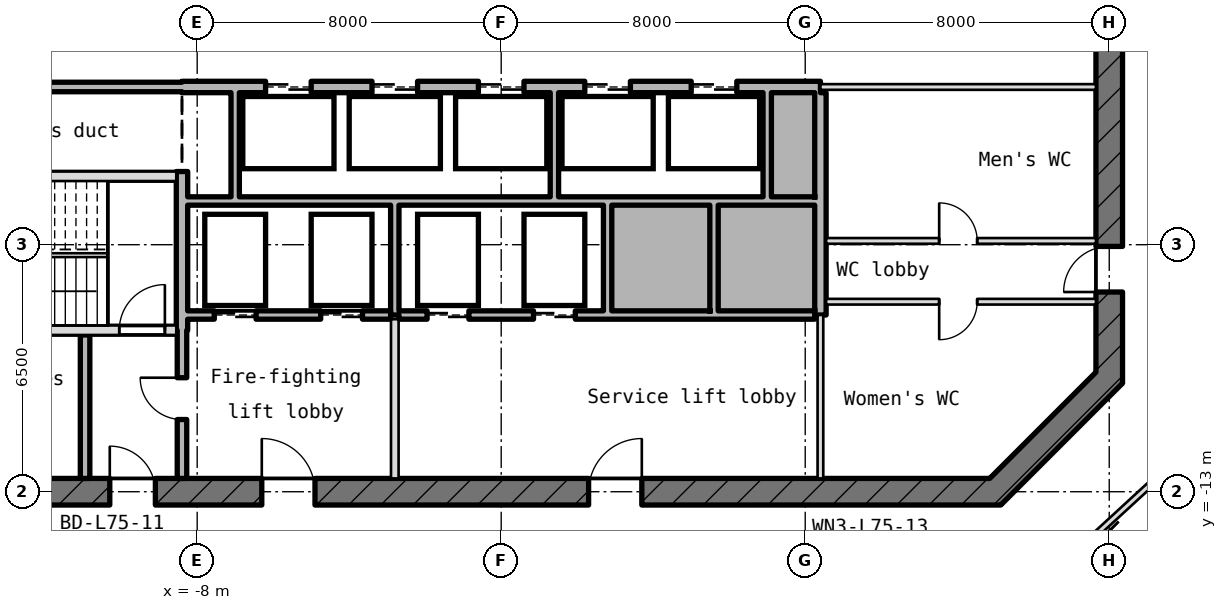
"""IFC4 building model, lengths in metres.
Left out: names, types, materials, properties, quantities, classifications, styles, units other than length and angle.
Written with IfcOpenShell. Run it as: python <this file> out.ifc"""

import sys

from ifc_helpers import new_model, si_unit, direction, frame, frame_2d, origin, place, context, subcontext, project, spatial, rectangle, extrude, element, fill, save


model = new_model("IFC4")
c1 = context("Model", 3, precision=1e-05, world=origin(), true_north=direction((0.0, 1.0)))
c2 = subcontext(c1, "Body", "Model", "MODEL_VIEW")
j1 = project(units=[si_unit("LENGTHUNIT", "METRE"), si_unit("PLANEANGLEUNIT", "RADIAN")], contexts=[c1])
p1 = place(None, origin())
s1 = spatial("IfcSite", under=j1, at=p1, CompositionType="ELEMENT")
p2 = place(p1, origin())
s2 = spatial("IfcBuilding", under=s1, at=p2, CompositionType="ELEMENT")
p3 = place(p2, frame((0.0, 0.0, 334.3)))
s3 = spatial("IfcBuildingStorey", under=s2, at=p3, CompositionType="ELEMENT", Elevation=334.3)
p4 = place(p3, frame((12.897, -13.103, -0.18), z_axis=(0.0, 0.0, 1.0), x_axis=(0.707106781187, 0.707106781187, 0.0)))
e1 = element("IfcWall", 1, at=p4, inside=s3, PredefinedType="SHEAR", context=c2, shape_type="SweptSolid", body=[
    extrude(rectangle(XDim=4.533, YDim=0.7, at=frame_2d((2.266, 0.0))), origin(), (0.0, 0.0, 1.0), 4.15),
])
p5 = place(p3, frame((16.0, -10.145, -0.18), z_axis=(0.0, 0.0, 1.0), x_axis=(0.0, 1.0, 0.0)))
e2 = element("IfcWall", 2, at=p5, inside=s3, PredefinedType="SHEAR", context=c2, shape_type="SweptSolid", body=[
    extrude(rectangle(XDim=20.29, YDim=0.7, at=frame_2d((10.145, 0.0))), origin(), (0.0, 0.0, 1.0), 4.15),
])
p6 = place(p5, frame((8.945, 0.0, 0.18)))
e3 = element("IfcOpeningElement", 3, at=p6, cuts=e2, PredefinedType="OPENING", context=c2, shape_type="SweptSolid", body=[
    extrude(rectangle(XDim=2.4, YDim=2.1, at=frame_2d((1.2, 1.05))), frame((0.0, 0.36, 0.0), z_axis=(0.0, -1.0, 0.0), x_axis=(1.0, 0.0, 0.0)), (0.0, 0.0, 1.0), 0.72),
])
p7 = place(p5, frame((13.545, 0.0, 0.18)))
e4 = element("IfcOpeningElement", 4, at=p7, cuts=e2, PredefinedType="OPENING", context=c2, shape_type="SweptSolid", body=[
    extrude(rectangle(XDim=1.2, YDim=2.1, at=frame_2d((0.6, 1.05))), frame((0.0, 0.36, 0.0), z_axis=(0.0, -1.0, 0.0), x_axis=(1.0, 0.0, 0.0)), (0.0, 0.0, 1.0), 0.72),
])
p8 = place(p5, frame((2.4, 0.0, 0.18)))
e5 = element("IfcOpeningElement", 5, at=p8, cuts=e2, PredefinedType="OPENING", context=c2, shape_type="SweptSolid", body=[
    extrude(rectangle(XDim=1.2, YDim=2.1, at=frame_2d((0.6, 1.05))), frame((0.0, 0.36, 0.0), z_axis=(0.0, -1.0, 0.0), x_axis=(1.0, 0.0, 0.0)), (0.0, 0.0, 1.0), 0.72),
])
p9 = place(p3, frame((-13.145, -13.0, -0.18), z_axis=(0.0, 0.0, 1.0), x_axis=(1.0, 0.0, 0.0)))
e6 = element("IfcWall", 6, at=p9, inside=s3, PredefinedType="SHEAR", context=c2, shape_type="SweptSolid", body=[
    extrude(rectangle(XDim=26.29, YDim=0.7, at=frame_2d((13.145, 0.0))), origin(), (0.0, 0.0, 1.0), 4.15),
])
p10 = place(p9, frame((2.845, 0.0, 0.18)))
e7 = element("IfcOpeningElement", 7, at=p10, cuts=e6, PredefinedType="OPENING", context=c2, shape_type="SweptSolid", body=[
    extrude(rectangle(XDim=1.2, YDim=2.1, at=frame_2d((0.6, 1.05))), frame((0.0, 0.36, 0.0), z_axis=(0.0, -1.0, 0.0), x_axis=(1.0, 0.0, 0.0)), (0.0, 0.0, 1.0), 0.72),
])
p11 = place(p9, frame((6.845, 0.0, 0.18)))
e8 = element("IfcOpeningElement", 8, at=p11, cuts=e6, PredefinedType="OPENING", context=c2, shape_type="SweptSolid", body=[
    extrude(rectangle(XDim=1.4, YDim=2.1, at=frame_2d((0.7, 1.05))), frame((0.0, 0.36, 0.0), z_axis=(0.0, -1.0, 0.0), x_axis=(1.0, 0.0, 0.0)), (0.0, 0.0, 1.0), 0.72),
])
p12 = place(p9, frame((15.445, 0.0, 0.18)))
e9 = element("IfcOpeningElement", 9, at=p12, cuts=e6, PredefinedType="OPENING", context=c2, shape_type="SweptSolid", body=[
    extrude(rectangle(XDim=1.4, YDim=2.1, at=frame_2d((0.7, 1.05))), frame((0.0, 0.36, 0.0), z_axis=(0.0, -1.0, 0.0), x_axis=(1.0, 0.0, 0.0)), (0.0, 0.0, 1.0), 0.72),
])
p13 = place(p3, frame((-15.65, -8.75, -0.18), z_axis=(0.0, 0.0, 1.0), x_axis=(1.0, 0.0, 0.0)))
e10 = element("IfcWall", 10, at=p13, inside=s3, PredefinedType="SHEAR", context=c2, shape_type="SweptSolid", body=[
    extrude(rectangle(XDim=7.1, YDim=0.25, at=frame_2d((3.55, 0.0))), origin(), (0.0, 0.0, 1.0), 4.15),
])
p14 = place(p13, frame((5.6, 0.0, 0.18)))
e11 = element("IfcOpeningElement", 11, at=p14, cuts=e10, PredefinedType="OPENING", context=c2, shape_type="SweptSolid", body=[
    extrude(rectangle(XDim=1.2, YDim=2.1, at=frame_2d((0.6, 1.05))), frame((0.0, 0.135, 0.0), z_axis=(0.0, -1.0, 0.0), x_axis=(1.0, 0.0, 0.0)), (0.0, 0.0, 1.0), 0.27),
])
p15 = place(p3, frame((-8.25, -8.35, 0.0), z_axis=(0.0, 0.0, 1.0), x_axis=(1.0, 0.0, 0.0)))
e12 = element("IfcWall", 12, at=p15, inside=s3, PredefinedType="STANDARD", context=c2, shape_type="SweptSolid", body=[
    extrude(rectangle(XDim=5.34, YDim=0.22, at=frame_2d((2.67, 0.0))), origin(), (0.0, 0.0, 1.0), 3.97),
])
p16 = place(p15, frame((0.7, 0.0, 0.0)))
e13 = element("IfcOpeningElement", 13, at=p16, cuts=e12, PredefinedType="OPENING", context=c2, shape_type="SweptSolid", body=[
    extrude(rectangle(XDim=1.1, YDim=2.1, at=frame_2d((0.55, 1.05))), frame((0.0, 0.12, 0.0), z_axis=(0.0, -1.0, 0.0), x_axis=(1.0, 0.0, 0.0)), (0.0, 0.0, 1.0), 0.24),
])
p17 = place(p15, frame((3.5, 0.0, 0.0)))
e14 = element("IfcOpeningElement", 14, at=p17, cuts=e12, PredefinedType="OPENING", context=c2, shape_type="SweptSolid", body=[
    extrude(rectangle(XDim=1.1, YDim=2.1, at=frame_2d((0.55, 1.05))), frame((0.0, 0.12, 0.0), z_axis=(0.0, -1.0, 0.0), x_axis=(1.0, 0.0, 0.0)), (0.0, 0.0, 1.0), 0.24),
])
p18 = place(p3, frame((-2.69, -8.35, 0.0), z_axis=(0.0, 0.0, 1.0), x_axis=(1.0, 0.0, 0.0)))
e15 = element("IfcWall", 15, at=p18, inside=s3, PredefinedType="STANDARD", context=c2, shape_type="SweptSolid", body=[
    extrude(rectangle(XDim=10.94, YDim=0.22, at=frame_2d((5.47, 0.0))), origin(), (0.0, 0.0, 1.0), 3.97),
])
p19 = place(p18, frame((0.74, 0.0, 0.0)))
e16 = element("IfcOpeningElement", 16, at=p19, cuts=e15, PredefinedType="OPENING", context=c2, shape_type="SweptSolid", body=[
    extrude(rectangle(XDim=1.1, YDim=2.1, at=frame_2d((0.55, 1.05))), frame((0.0, 0.12, 0.0), z_axis=(0.0, -1.0, 0.0), x_axis=(1.0, 0.0, 0.0)), (0.0, 0.0, 1.0), 0.24),
])
p20 = place(p18, frame((3.54, 0.0, 0.0)))
e17 = element("IfcOpeningElement", 17, at=p20, cuts=e15, PredefinedType="OPENING", context=c2, shape_type="SweptSolid", body=[
    extrude(rectangle(XDim=1.1, YDim=2.1, at=frame_2d((0.55, 1.05))), frame((0.0, 0.12, 0.0), z_axis=(0.0, -1.0, 0.0), x_axis=(1.0, 0.0, 0.0)), (0.0, 0.0, 1.0), 0.24),
])
p21 = place(p3, frame((8.55, -8.0, 0.0), z_axis=(0.0, 0.0, 1.0), x_axis=(1.0, 0.0, 0.0)))
e18 = element("IfcWall", 18, at=p21, inside=s3, PredefinedType="PARTITIONING", context=c2, shape_type="SweptSolid", body=[
    extrude(rectangle(XDim=7.1, YDim=0.15, at=frame_2d((3.55, 0.0))), origin(), (0.0, 0.0, 1.0), 3.97),
])
p22 = place(p21, frame((2.975, 0.0, 0.0)))
e19 = element("IfcOpeningElement", 19, at=p22, cuts=e18, PredefinedType="OPENING", context=c2, shape_type="SweptSolid", body=[
    extrude(rectangle(XDim=1.0, YDim=2.1, at=frame_2d((0.5, 1.05))), frame((0.0, 0.085, 0.0), z_axis=(0.0, -1.0, 0.0), x_axis=(1.0, 0.0, 0.0)), (0.0, 0.0, 1.0), 0.17),
])
p23 = place(p3, frame((8.55, -6.4, 0.0), z_axis=(0.0, 0.0, 1.0), x_axis=(1.0, 0.0, 0.0)))
e20 = element("IfcWall", 20, at=p23, inside=s3, PredefinedType="PARTITIONING", context=c2, shape_type="SweptSolid", body=[
    extrude(rectangle(XDim=7.1, YDim=0.15, at=frame_2d((3.55, 0.0))), origin(), (0.0, 0.0, 1.0), 3.97),
])
p24 = place(p23, frame((2.975, 0.0, 0.0)))
e21 = element("IfcOpeningElement", 21, at=p24, cuts=e20, PredefinedType="OPENING", context=c2, shape_type="SweptSolid", body=[
    extrude(rectangle(XDim=1.0, YDim=2.1, at=frame_2d((0.5, 1.05))), frame((0.0, 0.085, 0.0), z_axis=(0.0, -1.0, 0.0), x_axis=(1.0, 0.0, 0.0)), (0.0, 0.0, 1.0), 0.17),
])
p25 = place(p3, frame((-8.25, -5.35, 0.0), z_axis=(0.0, 0.0, 1.0), x_axis=(1.0, 0.0, 0.0)))
e22 = element("IfcWall", 22, at=p25, inside=s3, PredefinedType="STANDARD", context=c2, shape_type="SweptSolid", body=[
    extrude(rectangle(XDim=16.5, YDim=0.22, at=frame_2d((8.25, 0.0))), origin(), (0.0, 0.0, 1.0), 3.97),
])
p26 = place(p3, frame((-15.65, -4.7, -0.18), z_axis=(0.0, 0.0, 1.0), x_axis=(1.0, 0.0, 0.0)))
e23 = element("IfcWall", 23, at=p26, inside=s3, PredefinedType="SHEAR", context=c2, shape_type="SweptSolid", body=[
    extrude(rectangle(XDim=7.1, YDim=0.25, at=frame_2d((3.55, 0.0))), origin(), (0.0, 0.0, 1.0), 4.15),
])
p27 = place(p3, frame((-15.65, -2.35, 0.0), z_axis=(0.0, 0.0, 1.0), x_axis=(1.0, 0.0, 0.0)))
e24 = element("IfcWall", 24, at=p27, inside=s3, PredefinedType="STANDARD", context=c2, shape_type="SweptSolid", body=[
    extrude(rectangle(XDim=7.25, YDim=0.25, at=frame_2d((3.625, 0.0))), origin(), (0.0, 0.0, 1.0), 3.97),
])
p28 = place(p3, frame((-8.4, -2.35, -0.18), z_axis=(0.0, 0.0, 1.0), x_axis=(1.0, 0.0, 0.0)))
e25 = element("IfcWall", 25, at=p28, inside=s3, PredefinedType="SHEAR", context=c2, shape_type="SweptSolid", body=[
    extrude(rectangle(XDim=16.8, YDim=0.3, at=frame_2d((8.4, 0.0))), origin(), (0.0, 0.0, 1.0), 4.15),
])
p29 = place(p28, frame((2.2, 0.0, 0.18)))
e26 = element("IfcOpeningElement", 26, at=p29, cuts=e25, PredefinedType="OPENING", context=c2, shape_type="SweptSolid", body=[
    extrude(rectangle(XDim=1.2, YDim=2.1, at=frame_2d((0.6, 1.05))), frame((0.0, 0.16, 0.0), z_axis=(0.0, -1.0, 0.0), x_axis=(1.0, 0.0, 0.0)), (0.0, 0.0, 1.0), 0.32),
])
p30 = place(p28, frame((5.0, 0.0, 0.18)))
e27 = element("IfcOpeningElement", 27, at=p30, cuts=e25, PredefinedType="OPENING", context=c2, shape_type="SweptSolid", body=[
    extrude(rectangle(XDim=1.2, YDim=2.1, at=frame_2d((0.6, 1.05))), frame((0.0, 0.16, 0.0), z_axis=(0.0, -1.0, 0.0), x_axis=(1.0, 0.0, 0.0)), (0.0, 0.0, 1.0), 0.32),
])
p31 = place(p28, frame((7.8, 0.0, 0.18)))
e28 = element("IfcOpeningElement", 28, at=p31, cuts=e25, PredefinedType="OPENING", context=c2, shape_type="SweptSolid", body=[
    extrude(rectangle(XDim=1.2, YDim=2.1, at=frame_2d((0.6, 1.05))), frame((0.0, 0.16, 0.0), z_axis=(0.0, -1.0, 0.0), x_axis=(1.0, 0.0, 0.0)), (0.0, 0.0, 1.0), 0.32),
])
p32 = place(p28, frame((10.6, 0.0, 0.18)))
e29 = element("IfcOpeningElement", 29, at=p32, cuts=e25, PredefinedType="OPENING", context=c2, shape_type="SweptSolid", body=[
    extrude(rectangle(XDim=1.2, YDim=2.1, at=frame_2d((0.6, 1.05))), frame((0.0, 0.16, 0.0), z_axis=(0.0, -1.0, 0.0), x_axis=(1.0, 0.0, 0.0)), (0.0, 0.0, 1.0), 0.32),
])
p33 = place(p28, frame((13.4, 0.0, 0.18)))
e30 = element("IfcOpeningElement", 30, at=p33, cuts=e25, PredefinedType="OPENING", context=c2, shape_type="SweptSolid", body=[
    extrude(rectangle(XDim=1.2, YDim=2.1, at=frame_2d((0.6, 1.05))), frame((0.0, 0.16, 0.0), z_axis=(0.0, -1.0, 0.0), x_axis=(1.0, 0.0, 0.0)), (0.0, 0.0, 1.0), 0.32),
])
p34 = place(p3, frame((8.4, -2.35, 0.0), z_axis=(0.0, 0.0, 1.0), x_axis=(1.0, 0.0, 0.0)))
e31 = element("IfcWall", 31, at=p34, inside=s3, PredefinedType="PARTITIONING", context=c2, shape_type="SweptSolid", body=[
    extrude(rectangle(XDim=7.25, YDim=0.15, at=frame_2d((3.625, 0.0))), origin(), (0.0, 0.0, 1.0), 3.97),
])
p35 = place(p3, frame((-10.95, -12.65, 0.0), z_axis=(0.0, 0.0, 1.0), x_axis=(0.0, 1.0, 0.0)))
e32 = element("IfcWall", 32, at=p35, inside=s3, PredefinedType="STANDARD", context=c2, shape_type="SweptSolid", body=[
    extrude(rectangle(XDim=3.775, YDim=0.25, at=frame_2d((1.887, 0.0))), origin(), (0.0, 0.0, 1.0), 3.97),
])
p36 = place(p3, frame((-8.4, -12.65, 0.0), z_axis=(0.0, 0.0, 1.0), x_axis=(0.0, 1.0, 0.0)))
e33 = element("IfcWall", 33, at=p36, inside=s3, PredefinedType="STANDARD", context=c2, shape_type="SweptSolid", body=[
    extrude(rectangle(XDim=3.9, YDim=0.25, at=frame_2d((1.95, 0.0))), origin(), (0.0, 0.0, 1.0), 3.97),
])
p37 = place(p36, frame((1.55, 0.0, 0.0)))
e34 = element("IfcOpeningElement", 34, at=p37, cuts=e33, PredefinedType="OPENING", context=c2, shape_type="SweptSolid", body=[
    extrude(rectangle(XDim=1.1, YDim=2.1, at=frame_2d((0.55, 1.05))), frame((0.0, 0.135, 0.0), z_axis=(0.0, -1.0, 0.0), x_axis=(1.0, 0.0, 0.0)), (0.0, 0.0, 1.0), 0.27),
])
p38 = place(p3, frame((-8.4, -8.75, -0.18), z_axis=(0.0, 0.0, 1.0), x_axis=(0.0, 1.0, 0.0)))
e35 = element("IfcWall", 35, at=p38, inside=s3, PredefinedType="SHEAR", context=c2, shape_type="SweptSolid", body=[
    extrude(rectangle(XDim=4.175, YDim=0.3, at=frame_2d((2.087, 0.0))), origin(), (0.0, 0.0, 1.0), 4.15),
])
p39 = place(p3, frame((-7.0, -5.24, 0.0), z_axis=(0.0, 0.0, 1.0), x_axis=(0.0, 1.0, 0.0)))
e36 = element("IfcWall", 36, at=p39, inside=s3, PredefinedType="STANDARD", context=c2, shape_type="SweptSolid", body=[
    extrude(rectangle(XDim=2.74, YDim=0.22, at=frame_2d((1.37, 0.0))), origin(), (0.0, 0.0, 1.0), 3.97),
])
p40 = place(p3, frame((-2.8, -12.65, 0.0), z_axis=(0.0, 0.0, 1.0), x_axis=(0.0, 1.0, 0.0)))
e37 = element("IfcWall", 37, at=p40, inside=s3, PredefinedType="PARTITIONING", context=c2, shape_type="SweptSolid", body=[
    extrude(rectangle(XDim=4.19, YDim=0.2, at=frame_2d((2.095, 0.0))), origin(), (0.0, 0.0, 1.0), 3.97),
])
p41 = place(p3, frame((-2.8, -8.35, 0.0), z_axis=(0.0, 0.0, 1.0), x_axis=(0.0, 1.0, 0.0)))
e38 = element("IfcWall", 38, at=p41, inside=s3, PredefinedType="STANDARD", context=c2, shape_type="SweptSolid", body=[
    extrude(rectangle(XDim=2.89, YDim=0.22, at=frame_2d((1.445, 0.0))), origin(), (0.0, 0.0, 1.0), 3.97),
])
p42 = place(p3, frame((1.4, -5.24, 0.0), z_axis=(0.0, 0.0, 1.0), x_axis=(0.0, 1.0, 0.0)))
e39 = element("IfcWall", 39, at=p42, inside=s3, PredefinedType="STANDARD", context=c2, shape_type="SweptSolid", body=[
    extrude(rectangle(XDim=2.74, YDim=0.22, at=frame_2d((1.37, 0.0))), origin(), (0.0, 0.0, 1.0), 3.97),
])
for number, where, z_axis, x_axis in (
    (40, (2.8, -8.24, 0.0), (0.0, 0.0, 1.0), (0.0, 1.0, 0.0)),
    (41, (5.6, -8.24, 0.0), (0.0, 0.0, 1.0), (0.0, 1.0, 0.0)),
):
    element("IfcWall", number, at=place(p3, frame(where, z_axis=z_axis, x_axis=x_axis)), inside=s3, PredefinedType="STANDARD", context=c2, shape_type="SweptSolid", body=[
        extrude(rectangle(XDim=2.78, YDim=0.22, at=frame_2d((1.39, 0.0))), origin(), (0.0, 0.0, 1.0), 3.97),
    ])
p43 = place(p3, frame((7.0, -5.24, 0.0), z_axis=(0.0, 0.0, 1.0), x_axis=(0.0, 1.0, 0.0)))
e42 = element("IfcWall", 42, at=p43, inside=s3, PredefinedType="STANDARD", context=c2, shape_type="SweptSolid", body=[
    extrude(rectangle(XDim=2.74, YDim=0.22, at=frame_2d((1.37, 0.0))), origin(), (0.0, 0.0, 1.0), 3.97),
])
p44 = place(p3, frame((8.4, -12.65, 0.0), z_axis=(0.0, 0.0, 1.0), x_axis=(0.0, 1.0, 0.0)))
e43 = element("IfcWall", 43, at=p44, inside=s3, PredefinedType="PARTITIONING", context=c2, shape_type="SweptSolid", body=[
    extrude(rectangle(XDim=4.3, YDim=0.15, at=frame_2d((2.15, 0.0))), origin(), (0.0, 0.0, 1.0), 3.97),
])
p45 = place(p3, frame((8.4, -8.35, -0.18), z_axis=(0.0, 0.0, 1.0), x_axis=(0.0, 1.0, 0.0)))
e44 = element("IfcWall", 44, at=p45, inside=s3, PredefinedType="SHEAR", context=c2, shape_type="SweptSolid", body=[
    extrude(rectangle(XDim=5.85, YDim=0.3, at=frame_2d((2.925, 0.0))), origin(), (0.0, 0.0, 1.0), 4.15),
])
p46 = place(p3, frame((18.85, -11.18, 0.0), z_axis=(0.0, 0.0, 1.0), x_axis=(-0.736173458932, -0.676792906556, 0.0)))
e45 = element("IfcWall", 45, at=p46, inside=s3, PredefinedType="PARTITIONING", context=c2, shape_type="SweptSolid", body=[
    extrude(rectangle(XDim=6.381, YDim=0.15, at=frame_2d((3.19, 0.0))), origin(), (0.0, 0.0, 1.0), 3.97),
])
p47 = place(p29, origin())
e46 = element("IfcDoor", 46, at=p47, inside=s3, OperationType="DOUBLE_DOOR_SLIDING", PredefinedType="DOOR", context=c2, shape_type="SweptSolid", body=[
    extrude(rectangle(XDim=1.2, YDim=2.1, at=frame_2d((0.6, 1.05))), frame((0.0, 0.025, 0.0), z_axis=(0.0, -1.0, 0.0), x_axis=(1.0, 0.0, 0.0)), (0.0, 0.0, 1.0), 0.05),
])
fill(e26, e46)
p48 = place(p30, origin())
e47 = element("IfcDoor", 47, at=p48, inside=s3, OperationType="DOUBLE_DOOR_SLIDING", PredefinedType="DOOR", context=c2, shape_type="SweptSolid", body=[
    extrude(rectangle(XDim=1.2, YDim=2.1, at=frame_2d((0.6, 1.05))), frame((0.0, 0.025, 0.0), z_axis=(0.0, -1.0, 0.0), x_axis=(1.0, 0.0, 0.0)), (0.0, 0.0, 1.0), 0.05),
])
fill(e27, e47)
p49 = place(p31, origin())
e48 = element("IfcDoor", 48, at=p49, inside=s3, OperationType="DOUBLE_DOOR_SLIDING", PredefinedType="DOOR", context=c2, shape_type="SweptSolid", body=[
    extrude(rectangle(XDim=1.2, YDim=2.1, at=frame_2d((0.6, 1.05))), frame((0.0, 0.025, 0.0), z_axis=(0.0, -1.0, 0.0), x_axis=(1.0, 0.0, 0.0)), (0.0, 0.0, 1.0), 0.05),
])
fill(e28, e48)
p50 = place(p32, origin())
e49 = element("IfcDoor", 49, at=p50, inside=s3, OperationType="DOUBLE_DOOR_SLIDING", PredefinedType="DOOR", context=c2, shape_type="SweptSolid", body=[
    extrude(rectangle(XDim=1.2, YDim=2.1, at=frame_2d((0.6, 1.05))), frame((0.0, 0.025, 0.0), z_axis=(0.0, -1.0, 0.0), x_axis=(1.0, 0.0, 0.0)), (0.0, 0.0, 1.0), 0.05),
])
fill(e29, e49)
p51 = place(p33, origin())
e50 = element("IfcDoor", 50, at=p51, inside=s3, OperationType="DOUBLE_DOOR_SLIDING", PredefinedType="DOOR", context=c2, shape_type="SweptSolid", body=[
    extrude(rectangle(XDim=1.2, YDim=2.1, at=frame_2d((0.6, 1.05))), frame((0.0, 0.025, 0.0), z_axis=(0.0, -1.0, 0.0), x_axis=(1.0, 0.0, 0.0)), (0.0, 0.0, 1.0), 0.05),
])
fill(e30, e50)
p52 = place(p16, origin())
e51 = element("IfcDoor", 51, at=p52, inside=s3, OperationType="DOUBLE_DOOR_SLIDING", PredefinedType="DOOR", context=c2, shape_type="SweptSolid", body=[
    extrude(rectangle(XDim=1.1, YDim=2.1, at=frame_2d((0.55, 1.05))), frame((0.0, 0.025, 0.0), z_axis=(0.0, -1.0, 0.0), x_axis=(1.0, 0.0, 0.0)), (0.0, 0.0, 1.0), 0.05),
])
fill(e13, e51)
p53 = place(p17, origin())
e52 = element("IfcDoor", 52, at=p53, inside=s3, OperationType="DOUBLE_DOOR_SLIDING", PredefinedType="DOOR", context=c2, shape_type="SweptSolid", body=[
    extrude(rectangle(XDim=1.1, YDim=2.1, at=frame_2d((0.55, 1.05))), frame((0.0, 0.025, 0.0), z_axis=(0.0, -1.0, 0.0), x_axis=(1.0, 0.0, 0.0)), (0.0, 0.0, 1.0), 0.05),
])
fill(e14, e52)
p54 = place(p19, origin())
e53 = element("IfcDoor", 53, at=p54, inside=s3, OperationType="DOUBLE_DOOR_SLIDING", PredefinedType="DOOR", context=c2, shape_type="SweptSolid", body=[
    extrude(rectangle(XDim=1.1, YDim=2.1, at=frame_2d((0.55, 1.05))), frame((0.0, 0.025, 0.0), z_axis=(0.0, -1.0, 0.0), x_axis=(1.0, 0.0, 0.0)), (0.0, 0.0, 1.0), 0.05),
])
fill(e16, e53)
p55 = place(p20, origin())
e54 = element("IfcDoor", 54, at=p55, inside=s3, OperationType="DOUBLE_DOOR_SLIDING", PredefinedType="DOOR", context=c2, shape_type="SweptSolid", body=[
    extrude(rectangle(XDim=1.1, YDim=2.1, at=frame_2d((0.55, 1.05))), frame((0.0, 0.025, 0.0), z_axis=(0.0, -1.0, 0.0), x_axis=(1.0, 0.0, 0.0)), (0.0, 0.0, 1.0), 0.05),
])
fill(e17, e54)
p56 = place(p14, origin())
e55 = element("IfcDoor", 55, at=p56, inside=s3, OperationType="SINGLE_SWING_RIGHT", PredefinedType="DOOR", context=c2, shape_type="SweptSolid", body=[
    extrude(rectangle(XDim=1.2, YDim=2.1, at=frame_2d((0.6, 1.05))), frame((0.0, 0.025, 0.0), z_axis=(0.0, -1.0, 0.0), x_axis=(1.0, 0.0, 0.0)), (0.0, 0.0, 1.0), 0.05),
])
fill(e11, e55)
p57 = place(p37, origin())
e56 = element("IfcDoor", 56, at=p57, inside=s3, OperationType="SINGLE_SWING_RIGHT", PredefinedType="DOOR", context=c2, shape_type="SweptSolid", body=[
    extrude(rectangle(XDim=1.1, YDim=2.1, at=frame_2d((0.55, 1.05))), frame((0.0, 0.025, 0.0), z_axis=(0.0, -1.0, 0.0), x_axis=(1.0, 0.0, 0.0)), (0.0, 0.0, 1.0), 0.05),
])
fill(e34, e56)
p58 = place(p10, origin())
e57 = element("IfcDoor", 57, at=p58, inside=s3, OperationType="SINGLE_SWING_RIGHT", PredefinedType="DOOR", context=c2, shape_type="SweptSolid", body=[
    extrude(rectangle(XDim=1.2, YDim=2.1, at=frame_2d((0.6, 1.05))), frame((0.0, 0.025, 0.0), z_axis=(0.0, -1.0, 0.0), x_axis=(1.0, 0.0, 0.0)), (0.0, 0.0, 1.0), 0.05),
])
fill(e7, e57)
p59 = place(p11, origin())
e58 = element("IfcDoor", 58, at=p59, inside=s3, OperationType="SINGLE_SWING_RIGHT", PredefinedType="DOOR", context=c2, shape_type="SweptSolid", body=[
    extrude(rectangle(XDim=1.4, YDim=2.1, at=frame_2d((0.7, 1.05))), frame((0.0, 0.025, 0.0), z_axis=(0.0, -1.0, 0.0), x_axis=(1.0, 0.0, 0.0)), (0.0, 0.0, 1.0), 0.05),
])
fill(e8, e58)
p60 = place(p12, origin())
e59 = element("IfcDoor", 59, at=p60, inside=s3, OperationType="SINGLE_SWING_RIGHT", PredefinedType="DOOR", context=c2, shape_type="SweptSolid", body=[
    extrude(rectangle(XDim=1.4, YDim=2.1, at=frame_2d((0.7, 1.05))), frame((0.0, 0.025, 0.0), z_axis=(0.0, -1.0, 0.0), x_axis=(1.0, 0.0, 0.0)), (0.0, 0.0, 1.0), 0.05),
])
fill(e9, e59)
p61 = place(p24, origin())
e60 = element("IfcDoor", 60, at=p61, inside=s3, OperationType="SINGLE_SWING_RIGHT", PredefinedType="DOOR", context=c2, shape_type="SweptSolid", body=[
    extrude(rectangle(XDim=1.0, YDim=2.1, at=frame_2d((0.5, 1.05))), frame((0.0, 0.025, 0.0), z_axis=(0.0, -1.0, 0.0), x_axis=(1.0, 0.0, 0.0)), (0.0, 0.0, 1.0), 0.05),
])
fill(e21, e60)
p62 = place(p8, origin())
e61 = element("IfcDoor", 61, at=p62, inside=s3, OperationType="SINGLE_SWING_RIGHT", PredefinedType="DOOR", context=c2, shape_type="SweptSolid", body=[
    extrude(rectangle(XDim=1.2, YDim=2.1, at=frame_2d((0.6, 1.05))), frame((0.0, 0.025, 0.0), z_axis=(0.0, -1.0, 0.0), x_axis=(1.0, 0.0, 0.0)), (0.0, 0.0, 1.0), 0.05),
])
fill(e5, e61)
p63 = place(p22, frame((1.0, 0.0, 0.0), z_axis=(0.0, 0.0, 1.0), x_axis=(-1.0, 0.0, 0.0)))
e62 = element("IfcDoor", 62, at=p63, inside=s3, OperationType="SINGLE_SWING_LEFT", PredefinedType="DOOR", context=c2, shape_type="SweptSolid", body=[
    extrude(rectangle(XDim=1.0, YDim=2.1, at=frame_2d((0.5, 1.05))), frame((0.0, 0.025, 0.0), z_axis=(0.0, -1.0, 0.0), x_axis=(1.0, 0.0, 0.0)), (0.0, 0.0, 1.0), 0.05),
])
fill(e19, e62)
save(model, sys.argv[1])
